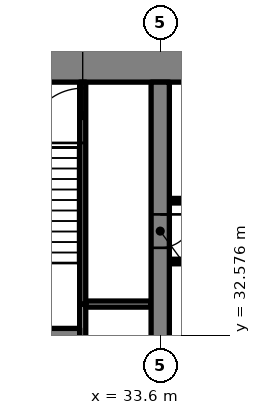
"""IFC4 building model, lengths in metres.
Left out: names, types, materials, properties, quantities, classifications, styles, units other than length and angle.
Written with IfcOpenShell. Run it as: python <this file> out.ifc"""

import sys

from ifc_helpers import new_model, si_unit, direction, frame, frame_2d, origin, place, context, subcontext, project, spatial, rectangle, extrude, source, transform, mapped, element, fill, save


model = new_model("IFC4")
c1 = context("Model", 3, precision=1e-05, world=origin(), true_north=direction((0.0, 1.0)))
c2 = subcontext(c1, "Body", "Model", "MODEL_VIEW")
j1 = project(units=[si_unit("LENGTHUNIT", "METRE"), si_unit("PLANEANGLEUNIT", "RADIAN")], contexts=[c1])
p1 = place(None, origin())
s1 = spatial("IfcSite", under=j1, at=p1, CompositionType="ELEMENT")
p2 = place(p1, origin())
s2 = spatial("IfcBuilding", under=s1, at=p2, CompositionType="ELEMENT")
p3 = place(p2, frame((0.0, 0.0, -9.0)))
s3 = spatial("IfcBuildingStorey", under=s2, at=p3, CompositionType="ELEMENT", Elevation=-9.0)
m1 = source(origin(), c2, "Body", "SweptSolid", [
    extrude(rectangle(XDim=50.4, YDim=1.1, at=frame_2d((25.2, 0.0))), origin(), (0.0, 0.0, 1.0), 4.22),
])
p4 = place(p3, frame((25.2, 41.45, 0.0), z_axis=(0.0, 0.0, 1.0), x_axis=(1.0, 0.0, 0.0)))
e1 = element("IfcWall", 1, at=p4, inside=s3, PredefinedType="SHEAR", context=c2, shape_type="MappedRepresentation", body=[
    mapped(m1, transform((0.0, 0.0, 0.0), scale=1.0)),
])
m2 = source(origin(), c2, "Body", "SweptSolid", [
    extrude(rectangle(XDim=17.8, YDim=0.6, at=frame_2d((8.9, 0.0))), origin(), (0.0, 0.0, 1.0), 4.22),
])
p5 = place(p3, frame((33.6, 23.1, 0.0), z_axis=(0.0, 0.0, 1.0), x_axis=(0.0, 1.0, 0.0)))
e2 = element("IfcWall", 2, at=p5, inside=s3, PredefinedType="SHEAR", context=c2, shape_type="MappedRepresentation", body=[
    mapped(m2, transform((0.0, 0.0, 0.0), scale=1.0)),
])
m3 = source(origin(), c2, "Body", "SweptSolid", [
    extrude(rectangle(XDim=1.1, YDim=2.1, at=frame_2d((0.55, 1.05))), frame((0.0, 0.31, 0.0), z_axis=(0.0, -1.0, 0.0), x_axis=(1.0, 0.0, 0.0)), (0.0, 0.0, 1.0), 0.62),
])
p6 = place(p5, frame((12.35, 0.0, 0.0)))
e3 = element("IfcOpeningElement", 3, at=p6, cuts=e2, PredefinedType="OPENING", context=c2, shape_type="MappedRepresentation", body=[
    mapped(m3, transform((0.0, 0.0, 0.0), scale=1.0)),
])
m4 = source(origin(), c2, "Body", "SweptSolid", [
    extrude(rectangle(XDim=14.1, YDim=0.15, at=frame_2d((7.05, 0.0))), origin(), (0.0, 0.0, 1.0), 4.22),
])
p7 = place(p3, frame((33.9, 35.0, 0.0), z_axis=(0.0, 0.0, 1.0), x_axis=(1.0, 0.0, 0.0)))
e4 = element("IfcWall", 4, at=p7, inside=s3, PredefinedType="PARTITIONING", context=c2, shape_type="MappedRepresentation", body=[
    mapped(m4, transform((0.0, 0.0, 0.0), scale=1.0)),
])
m5 = source(origin(), c2, "Body", "SweptSolid", [
    extrude(rectangle(XDim=0.9, YDim=2.1, at=frame_2d((0.45, 1.05))), frame((0.0, 0.085, 0.0), z_axis=(0.0, -1.0, 0.0), x_axis=(1.0, 0.0, 0.0)), (0.0, 0.0, 1.0), 0.17),
])
p8 = place(p7, frame((6.562, 0.0, 0.0)))
e5 = element("IfcOpeningElement", 5, at=p8, cuts=e4, PredefinedType="OPENING", context=c2, shape_type="MappedRepresentation", body=[
    mapped(m5, transform((0.0, 0.0, 0.0), scale=1.0)),
])
m6 = source(origin(), c2, "Body", "SweptSolid", [
    extrude(rectangle(XDim=16.2, YDim=0.15, at=frame_2d((8.1, 0.0))), origin(), (0.0, 0.0, 1.0), 4.22),
])
p9 = place(p3, frame((33.9, 37.0, 0.0), z_axis=(0.0, 0.0, 1.0), x_axis=(1.0, 0.0, 0.0)))
e6 = element("IfcWall", 6, at=p9, inside=s3, PredefinedType="PARTITIONING", context=c2, shape_type="MappedRepresentation", body=[
    mapped(m6, transform((0.0, 0.0, 0.0), scale=1.0)),
])
p10 = place(p9, frame((0.765, 0.0, 0.0)))
e7 = element("IfcOpeningElement", 7, at=p10, cuts=e6, PredefinedType="OPENING", context=c2, shape_type="MappedRepresentation", body=[
    mapped(m5, transform((0.0, 0.0, 0.0), scale=1.0)),
])
p11 = place(p9, frame((3.6, 0.0, 0.0)))
e8 = element("IfcOpeningElement", 8, at=p11, cuts=e6, PredefinedType="OPENING", context=c2, shape_type="MappedRepresentation", body=[
    mapped(m5, transform((0.0, 0.0, 0.0), scale=1.0)),
])
p12 = place(p9, frame((9.27, 0.0, 0.0)))
e9 = element("IfcOpeningElement", 9, at=p12, cuts=e6, PredefinedType="OPENING", context=c2, shape_type="MappedRepresentation", body=[
    mapped(m5, transform((0.0, 0.0, 0.0), scale=1.0)),
])
p13 = place(p9, frame((14.535, 0.0, 0.0)))
e10 = element("IfcOpeningElement", 10, at=p13, cuts=e6, PredefinedType="OPENING", context=c2, shape_type="MappedRepresentation", body=[
    mapped(m5, transform((0.0, 0.0, 0.0), scale=1.0)),
])
m7 = source(origin(), c2, "Body", "SweptSolid", [
    extrude(rectangle(XDim=1.7, YDim=0.2, at=frame_2d((0.85, 0.0))), origin(), (0.0, 0.0, 1.0), 4.22),
])
p14 = place(p3, frame((31.05, 31.9, 0.0), z_axis=(0.0, 0.0, 1.0), x_axis=(0.0, 1.0, 0.0)))
e11 = element("IfcWall", 11, at=p14, inside=s3, PredefinedType="SOLIDWALL", context=c2, shape_type="MappedRepresentation", body=[
    mapped(m7, transform((0.0, 0.0, 0.0), scale=1.0)),
])
m8 = source(origin(), c2, "Body", "SweptSolid", [
    extrude(rectangle(XDim=2.15, YDim=0.2, at=frame_2d((1.075, 0.0))), origin(), (0.0, 0.0, 1.0), 4.22),
])
p15 = place(p3, frame((31.15, 33.6, 0.0), z_axis=(0.0, 0.0, 1.0), x_axis=(1.0, 0.0, 0.0)))
e12 = element("IfcWall", 12, at=p15, inside=s3, PredefinedType="SOLIDWALL", context=c2, shape_type="MappedRepresentation", body=[
    mapped(m8, transform((0.0, 0.0, 0.0), scale=1.0)),
])
m9 = source(origin(), c2, "Body", "SweptSolid", [
    extrude(rectangle(XDim=7.3, YDim=0.2, at=frame_2d((3.65, 0.0))), origin(), (0.0, 0.0, 1.0), 4.22),
])
p16 = place(p3, frame((31.05, 33.6, 0.0), z_axis=(0.0, 0.0, 1.0), x_axis=(0.0, 1.0, 0.0)))
e13 = element("IfcWall", 13, at=p16, inside=s3, PredefinedType="SOLIDWALL", context=c2, shape_type="MappedRepresentation", body=[
    mapped(m9, transform((0.0, 0.0, 0.0), scale=1.0)),
])
m10 = source(origin(), c2, "Body", "SweptSolid", [
    extrude(rectangle(XDim=1.8, YDim=2.1, at=frame_2d((0.9, 1.05))), frame((0.0, 0.11, 0.0), z_axis=(0.0, -1.0, 0.0), x_axis=(1.0, 0.0, 0.0)), (0.0, 0.0, 1.0), 0.22),
])
p17 = place(p16, frame((5.3, 0.0, 0.0)))
e14 = element("IfcOpeningElement", 14, at=p17, cuts=e13, PredefinedType="OPENING", context=c2, shape_type="MappedRepresentation", body=[
    mapped(m10, transform((0.0, 0.0, 0.0), scale=1.0)),
])
m11 = source(origin(), c2, "Body", "SweptSolid", [
    extrude(rectangle(XDim=4.65, YDim=0.9, at=frame_2d((2.325, 0.0))), origin(), (0.0, 0.0, 1.0), 4.22),
])
p18 = place(p3, frame((26.3, 32.35, 0.0), z_axis=(0.0, 0.0, 1.0), x_axis=(1.0, 0.0, 0.0)))
e15 = element("IfcWall", 15, at=p18, inside=s3, PredefinedType="SOLIDWALL", context=c2, shape_type="MappedRepresentation", body=[
    mapped(m11, transform((0.0, 0.0, 0.0), scale=1.0)),
])
m12 = source(origin(), c2, "Body", "SweptSolid", [
    extrude(rectangle(XDim=1.8, YDim=2.1, at=frame_2d((0.9, 1.05))), frame((0.0, 0.025, 0.0), z_axis=(0.0, -1.0, 0.0), x_axis=(1.0, 0.0, 0.0)), (0.0, 0.0, 1.0), 0.05),
])
p19 = place(p17, origin())
e16 = element("IfcDoor", 16, at=p19, inside=s3, OperationType="SINGLE_SWING_LEFT", PredefinedType="DOOR", context=c2, shape_type="MappedRepresentation", body=[
    mapped(m12, transform((0.0, 0.0, 0.0), scale=1.0)),
])
fill(e14, e16)
m13 = source(origin(), c2, "Body", "SweptSolid", [
    extrude(rectangle(XDim=1.1, YDim=2.1, at=frame_2d((0.55, 1.05))), frame((0.0, 0.025, 0.0), z_axis=(0.0, -1.0, 0.0), x_axis=(1.0, 0.0, 0.0)), (0.0, 0.0, 1.0), 0.05),
])
p20 = place(p6, origin())
e17 = element("IfcDoor", 17, at=p20, inside=s3, OperationType="SINGLE_SWING_RIGHT", PredefinedType="DOOR", context=c2, shape_type="MappedRepresentation", body=[
    mapped(m13, transform((0.0, 0.0, 0.0), scale=1.0)),
])
fill(e3, e17)
save(model, sys.argv[1])
